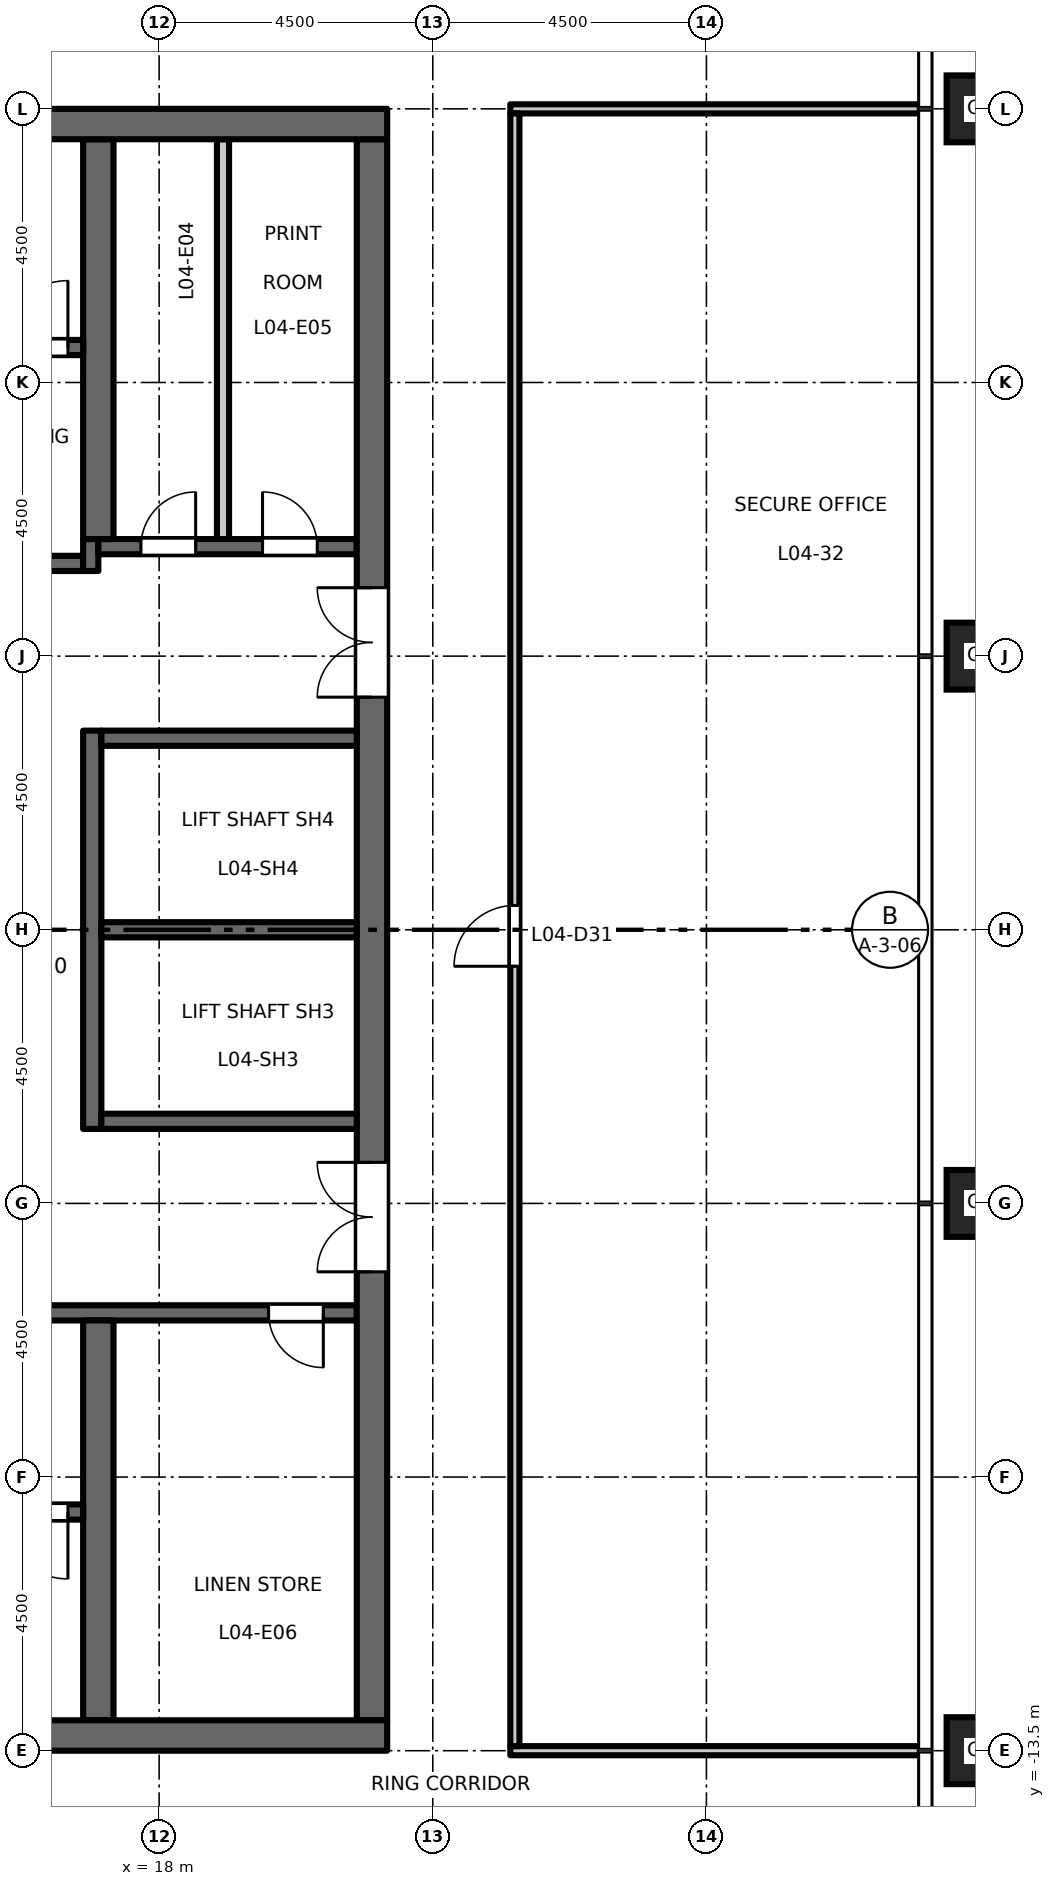
"""IFC4 building model, lengths in metres.
Left out: names, types, materials, properties, quantities, classifications, styles, units other than length and angle.
Written with IfcOpenShell. Run it as: python <this file> out.ifc"""

import sys

from ifc_helpers import new_model, si_unit, direction, frame, frame_2d, origin, origin_2d, place, context, subcontext, project, spatial, rectangle, hollow_rectangle, extrude, element, fill, save


model = new_model("IFC4")
c1 = context("Model", 3, precision=1e-05, world=origin(), true_north=direction((0.0, 1.0)))
c2 = subcontext(c1, "Body", "Model", "MODEL_VIEW")
j1 = project(units=[si_unit("LENGTHUNIT", "METRE"), si_unit("PLANEANGLEUNIT", "RADIAN")], contexts=[c1])
p1 = place(None, origin())
s1 = spatial("IfcSite", under=j1, at=p1, CompositionType="ELEMENT")
p2 = place(p1, origin())
s2 = spatial("IfcBuilding", under=s1, at=p2, CompositionType="ELEMENT")
p3 = place(p2, frame((0.0, 0.0, 22.2)))
s3 = spatial("IfcBuildingStorey", under=s2, at=p3, CompositionType="ELEMENT", Elevation=22.2)
for number, where, z_axis, x_axis in (
    (1, (31.5, -13.5, 0.0), (0.0, 0.0, 1.0), (1.0, 0.0, 0.0)),
    (2, (31.5, -4.5, 0.0), (0.0, 0.0, 1.0), (1.0, 0.0, 0.0)),
    (3, (31.5, 4.5, 0.0), (0.0, 0.0, 1.0), (1.0, 0.0, 0.0)),
    (4, (31.5, 13.5, 0.0), (0.0, 0.0, 1.0), (1.0, 0.0, 0.0)),
):
    element("IfcColumn", number, at=place(p3, frame(where, z_axis=z_axis, x_axis=x_axis)), inside=s3, PredefinedType="COLUMN", context=c2, shape_type="SweptSolid", body=[
        extrude(hollow_rectangle(XDim=1.1, YDim=1.1, WallThickness=0.07, at=origin_2d()), origin(), (0.0, 0.0, 1.0), 4.5),
    ])
p4 = place(p3, frame((12.15, 6.025, 0.0), z_axis=(0.0, 0.0, 1.0), x_axis=(1.0, 0.0, 0.0)))
e5 = element("IfcWall", 5, at=p4, inside=s3, PredefinedType="SHEAR", context=c2, shape_type="SweptSolid", body=[
    extrude(rectangle(XDim=4.6, YDim=0.25, at=frame_2d((2.3, 0.0))), origin(), (0.0, 0.0, 1.0), 4.35),
])
p5 = place(p4, frame((1.8, 0.0, 0.0)))
e6 = element("IfcOpeningElement", 6, at=p5, cuts=e5, PredefinedType="OPENING", context=c2, shape_type="SweptSolid", body=[
    extrude(rectangle(XDim=1.0, YDim=2.1, at=frame_2d((0.5, 1.05))), frame((0.0, 0.135, 0.0), z_axis=(0.0, -1.0, 0.0), x_axis=(1.0, 0.0, 0.0)), (0.0, 0.0, 1.0), 0.27),
])
p6 = place(p3, frame((16.875, 5.9, 0.0), z_axis=(0.0, 0.0, 1.0), x_axis=(0.0, 1.0, 0.0)))
e7 = element("IfcWall", 7, at=p6, inside=s3, PredefinedType="SHEAR", context=c2, shape_type="SweptSolid", body=[
    extrude(rectangle(XDim=0.525, YDim=0.25, at=frame_2d((0.263, 0.0))), origin(), (0.0, 0.0, 1.0), 4.35),
])
p7 = place(p3, frame((17.0, 6.3, 0.0), z_axis=(0.0, 0.0, 1.0), x_axis=(1.0, 0.0, 0.0)))
e8 = element("IfcWall", 8, at=p7, inside=s3, PredefinedType="SHEAR", context=c2, shape_type="SweptSolid", body=[
    extrude(rectangle(XDim=4.25, YDim=0.25, at=frame_2d((2.125, 0.0))), origin(), (0.0, 0.0, 1.0), 4.35),
])
p8 = place(p7, frame((0.7, 0.0, 0.0)))
e9 = element("IfcOpeningElement", 9, at=p8, cuts=e8, PredefinedType="OPENING", context=c2, shape_type="SweptSolid", body=[
    extrude(rectangle(XDim=0.9, YDim=2.1, at=frame_2d((0.45, 1.05))), frame((0.0, 0.135, 0.0), z_axis=(0.0, -1.0, 0.0), x_axis=(1.0, 0.0, 0.0)), (0.0, 0.0, 1.0), 0.27),
])
p9 = place(p7, frame((2.7, 0.0, 0.0)))
e10 = element("IfcOpeningElement", 10, at=p9, cuts=e8, PredefinedType="OPENING", context=c2, shape_type="SweptSolid", body=[
    extrude(rectangle(XDim=0.9, YDim=2.1, at=frame_2d((0.45, 1.05))), frame((0.0, 0.135, 0.0), z_axis=(0.0, -1.0, 0.0), x_axis=(1.0, 0.0, 0.0)), (0.0, 0.0, 1.0), 0.27),
])
p10 = place(p3, frame((12.15, -6.3, 0.0), z_axis=(0.0, 0.0, 1.0), x_axis=(1.0, 0.0, 0.0)))
e11 = element("IfcWall", 11, at=p10, inside=s3, PredefinedType="SHEAR", context=c2, shape_type="SweptSolid", body=[
    extrude(rectangle(XDim=9.1, YDim=0.25, at=frame_2d((4.55, 0.0))), origin(), (0.0, 0.0, 1.0), 4.35),
])
p11 = place(p10, frame((1.8, 0.0, 0.0)))
e12 = element("IfcOpeningElement", 12, at=p11, cuts=e11, PredefinedType="OPENING", context=c2, shape_type="SweptSolid", body=[
    extrude(rectangle(XDim=1.0, YDim=2.1, at=frame_2d((0.5, 1.05))), frame((0.0, 0.135, 0.0), z_axis=(0.0, -1.0, 0.0), x_axis=(1.0, 0.0, 0.0)), (0.0, 0.0, 1.0), 0.27),
])
p12 = place(p10, frame((7.65, 0.0, 0.0)))
e13 = element("IfcOpeningElement", 13, at=p12, cuts=e11, PredefinedType="OPENING", context=c2, shape_type="SweptSolid", body=[
    extrude(rectangle(XDim=0.9, YDim=2.1, at=frame_2d((0.45, 1.05))), frame((0.0, 0.135, 0.0), z_axis=(0.0, -1.0, 0.0), x_axis=(1.0, 0.0, 0.0)), (0.0, 0.0, 1.0), 0.27),
])
p13 = place(p3, frame((21.5, -13.0, 0.0), z_axis=(0.0, 0.0, 1.0), x_axis=(0.0, 1.0, 0.0)))
e14 = element("IfcWall", 14, at=p13, inside=s3, PredefinedType="SHEAR", context=c2, shape_type="SweptSolid", body=[
    extrude(rectangle(XDim=26.0, YDim=0.5, at=frame_2d((13.0, 0.0))), origin(), (0.0, 0.0, 1.0), 4.35),
])
p14 = place(p13, frame((16.825, 0.0, 0.0)))
e15 = element("IfcOpeningElement", 15, at=p14, cuts=e14, PredefinedType="OPENING", context=c2, shape_type="SweptSolid", body=[
    extrude(rectangle(XDim=1.8, YDim=2.1, at=frame_2d((0.9, 1.05))), frame((0.0, 0.26, 0.0), z_axis=(0.0, -1.0, 0.0), x_axis=(1.0, 0.0, 0.0)), (0.0, 0.0, 1.0), 0.52),
])
p15 = place(p13, frame((7.375, 0.0, 0.0)))
e16 = element("IfcOpeningElement", 16, at=p15, cuts=e14, PredefinedType="OPENING", context=c2, shape_type="SweptSolid", body=[
    extrude(rectangle(XDim=1.8, YDim=2.1, at=frame_2d((0.9, 1.05))), frame((0.0, 0.26, 0.0), z_axis=(0.0, -1.0, 0.0), x_axis=(1.0, 0.0, 0.0)), (0.0, 0.0, 1.0), 0.52),
])
p16 = place(p3, frame((19.05, 6.425, 0.0), z_axis=(0.0, 0.0, 1.0), x_axis=(0.0, 1.0, 0.0)))
e17 = element("IfcWall", 17, at=p16, inside=s3, PredefinedType="PARTITIONING", context=c2, shape_type="SweptSolid", body=[
    extrude(rectangle(XDim=6.575, YDim=0.2, at=frame_2d((3.288, 0.0))), origin(), (0.0, 0.0, 1.0), 4.35),
])
p17 = place(p3, frame((16.9, -3.275, 0.0), z_axis=(0.0, 0.0, 1.0), x_axis=(0.0, 1.0, 0.0)))
e18 = element("IfcWall", 18, at=p17, inside=s3, PredefinedType="SHEAR", context=c2, shape_type="SweptSolid", body=[
    extrude(rectangle(XDim=6.55, YDim=0.3, at=frame_2d((3.275, 0.0))), origin(), (0.0, 0.0, 1.0), 4.35),
])
for number, where, z_axis, x_axis in (
    (19, (17.05, 0.0, 0.0), (0.0, 0.0, 1.0), (1.0, 0.0, 0.0)),
    (20, (17.05, 3.15, 0.0), (0.0, 0.0, 1.0), (1.0, 0.0, 0.0)),
    (21, (17.05, -3.15, 0.0), (0.0, 0.0, 1.0), (1.0, 0.0, 0.0)),
):
    element("IfcWall", number, at=place(p3, frame(where, z_axis=z_axis, x_axis=x_axis)), inside=s3, PredefinedType="SHEAR", context=c2, shape_type="SweptSolid", body=[
        extrude(rectangle(XDim=4.2, YDim=0.25, at=frame_2d((2.1, 0.0))), origin(), (0.0, 0.0, 1.0), 4.35),
    ])
for number, where, z_axis, x_axis in (
    (22, (17.0, 6.425, 0.0), (0.0, 0.0, 1.0), (0.0, 1.0, 0.0)),
    (23, (17.0, -13.0, 0.0), (0.0, 0.0, 1.0), (0.0, 1.0, 0.0)),
):
    element("IfcWall", number, at=place(p3, frame(where, z_axis=z_axis, x_axis=x_axis)), inside=s3, PredefinedType="SHEAR", context=c2, shape_type="SweptSolid", body=[
        extrude(rectangle(XDim=6.575, YDim=0.5, at=frame_2d((3.288, 0.0))), origin(), (0.0, 0.0, 1.0), 4.35),
    ])
p18 = place(p3, frame((8.75, 9.575, 0.0), z_axis=(0.0, 0.0, 1.0), x_axis=(1.0, 0.0, 0.0)))
e24 = element("IfcWall", 24, at=p18, inside=s3, PredefinedType="SHEAR", context=c2, shape_type="SweptSolid", body=[
    extrude(rectangle(XDim=8.0, YDim=0.25, at=frame_2d((4.0, 0.0))), origin(), (0.0, 0.0, 1.0), 4.35),
])
p19 = place(p18, frame((6.65, 0.0, 0.0)))
e25 = element("IfcOpeningElement", 25, at=p19, cuts=e24, PredefinedType="OPENING", context=c2, shape_type="SweptSolid", body=[
    extrude(rectangle(XDim=1.1, YDim=2.1, at=frame_2d((0.55, 1.05))), frame((0.0, 0.135, 0.0), z_axis=(0.0, -1.0, 0.0), x_axis=(1.0, 0.0, 0.0)), (0.0, 0.0, 1.0), 0.27),
])
p20 = place(p3, frame((8.75, -9.575, 0.0), z_axis=(0.0, 0.0, 1.0), x_axis=(1.0, 0.0, 0.0)))
e26 = element("IfcWall", 26, at=p20, inside=s3, PredefinedType="SHEAR", context=c2, shape_type="SweptSolid", body=[
    extrude(rectangle(XDim=8.0, YDim=0.25, at=frame_2d((4.0, 0.0))), origin(), (0.0, 0.0, 1.0), 4.35),
])
p21 = place(p20, frame((6.65, 0.0, 0.0)))
e27 = element("IfcOpeningElement", 27, at=p21, cuts=e26, PredefinedType="OPENING", context=c2, shape_type="SweptSolid", body=[
    extrude(rectangle(XDim=1.1, YDim=2.1, at=frame_2d((0.55, 1.05))), frame((0.0, 0.135, 0.0), z_axis=(0.0, -1.0, 0.0), x_axis=(1.0, 0.0, 0.0)), (0.0, 0.0, 1.0), 0.27),
])
for number, where, z_axis, x_axis in (
    (28, (8.25, 13.25, 0.0), (0.0, 0.0, 1.0), (1.0, 0.0, 0.0)),
    (29, (8.25, -13.25, 0.0), (0.0, 0.0, 1.0), (1.0, 0.0, 0.0)),
):
    element("IfcWall", number, at=place(p3, frame(where, z_axis=z_axis, x_axis=x_axis)), inside=s3, PredefinedType="SHEAR", context=c2, shape_type="SweptSolid", body=[
        extrude(rectangle(XDim=13.5, YDim=0.5, at=frame_2d((6.75, 0.0))), origin(), (0.0, 0.0, 1.0), 4.35),
    ])
for number, where, z_axis, x_axis in (
    (30, (23.775, -13.5, 0.0), (0.0, 0.0, 1.0), (1.0, 0.0, 0.0)),
    (31, (23.775, 13.5, 0.0), (0.0, 0.0, 1.0), (1.0, 0.0, 0.0)),
):
    element("IfcWall", number, at=place(p3, frame(where, z_axis=z_axis, x_axis=x_axis)), inside=s3, PredefinedType="PARTITIONING", context=c2, shape_type="SweptSolid", body=[
        extrude(rectangle(XDim=6.735, YDim=0.15, at=frame_2d((3.368, 0.0))), origin(), (0.0, 0.0, 1.0), 3.35),
    ])
p22 = place(p3, frame((23.85, -13.425, 0.0), z_axis=(0.0, 0.0, 1.0), x_axis=(0.0, 1.0, 0.0)))
e32 = element("IfcWall", 32, at=p22, inside=s3, PredefinedType="PARTITIONING", context=c2, shape_type="SweptSolid", body=[
    extrude(rectangle(XDim=26.85, YDim=0.15, at=frame_2d((13.425, 0.0))), origin(), (0.0, 0.0, 1.0), 4.35),
])
p23 = place(p22, frame((12.825, 0.0, 0.0)))
e33 = element("IfcOpeningElement", 33, at=p23, cuts=e32, PredefinedType="OPENING", context=c2, shape_type="SweptSolid", body=[
    extrude(rectangle(XDim=1.0, YDim=2.1, at=frame_2d((0.5, 1.05))), frame((0.0, 0.085, 0.0), z_axis=(0.0, -1.0, 0.0), x_axis=(1.0, 0.0, 0.0)), (0.0, 0.0, 1.0), 0.17),
])
p24 = place(p19, origin())
e34 = element("IfcDoor", 34, at=p24, inside=s3, OperationType="SINGLE_SWING_LEFT", PredefinedType="DOOR", context=c2, shape_type="SweptSolid", body=[
    extrude(rectangle(XDim=1.1, YDim=2.1, at=frame_2d((0.55, 1.05))), frame((0.0, 0.025, 0.0), z_axis=(0.0, -1.0, 0.0), x_axis=(1.0, 0.0, 0.0)), (0.0, 0.0, 1.0), 0.05),
])
fill(e25, e34)
p25 = place(p21, origin())
e35 = element("IfcDoor", 35, at=p25, inside=s3, OperationType="SINGLE_SWING_RIGHT", PredefinedType="DOOR", context=c2, shape_type="SweptSolid", body=[
    extrude(rectangle(XDim=1.1, YDim=2.1, at=frame_2d((0.55, 1.05))), frame((0.0, 0.025, 0.0), z_axis=(0.0, -1.0, 0.0), x_axis=(1.0, 0.0, 0.0)), (0.0, 0.0, 1.0), 0.05),
])
fill(e27, e35)
p26 = place(p14, origin())
e36 = element("IfcDoor", 36, at=p26, inside=s3, OperationType="DOUBLE_DOOR_DOUBLE_SWING", PredefinedType="DOOR", context=c2, shape_type="SweptSolid", body=[
    extrude(rectangle(XDim=1.8, YDim=2.1, at=frame_2d((0.9, 1.05))), frame((0.0, 0.025, 0.0), z_axis=(0.0, -1.0, 0.0), x_axis=(1.0, 0.0, 0.0)), (0.0, 0.0, 1.0), 0.05),
])
fill(e15, e36)
p27 = place(p15, origin())
e37 = element("IfcDoor", 37, at=p27, inside=s3, OperationType="DOUBLE_DOOR_DOUBLE_SWING", PredefinedType="DOOR", context=c2, shape_type="SweptSolid", body=[
    extrude(rectangle(XDim=1.8, YDim=2.1, at=frame_2d((0.9, 1.05))), frame((0.0, 0.025, 0.0), z_axis=(0.0, -1.0, 0.0), x_axis=(1.0, 0.0, 0.0)), (0.0, 0.0, 1.0), 0.05),
])
fill(e16, e37)
p28 = place(p8, origin())
e38 = element("IfcDoor", 38, at=p28, inside=s3, OperationType="SINGLE_SWING_LEFT", PredefinedType="DOOR", context=c2, shape_type="SweptSolid", body=[
    extrude(rectangle(XDim=0.9, YDim=2.1, at=frame_2d((0.45, 1.05))), frame((0.0, 0.025, 0.0), z_axis=(0.0, -1.0, 0.0), x_axis=(1.0, 0.0, 0.0)), (0.0, 0.0, 1.0), 0.05),
])
fill(e9, e38)
p29 = place(p9, origin())
e39 = element("IfcDoor", 39, at=p29, inside=s3, OperationType="SINGLE_SWING_RIGHT", PredefinedType="DOOR", context=c2, shape_type="SweptSolid", body=[
    extrude(rectangle(XDim=0.9, YDim=2.1, at=frame_2d((0.45, 1.05))), frame((0.0, 0.025, 0.0), z_axis=(0.0, -1.0, 0.0), x_axis=(1.0, 0.0, 0.0)), (0.0, 0.0, 1.0), 0.05),
])
fill(e10, e39)
p30 = place(p12, origin())
e40 = element("IfcDoor", 40, at=p30, inside=s3, OperationType="SINGLE_SWING_RIGHT", PredefinedType="DOOR", context=c2, shape_type="SweptSolid", body=[
    extrude(rectangle(XDim=0.9, YDim=2.1, at=frame_2d((0.45, 1.05))), frame((0.0, 0.025, 0.0), z_axis=(0.0, -1.0, 0.0), x_axis=(1.0, 0.0, 0.0)), (0.0, 0.0, 1.0), 0.05),
])
fill(e13, e40)
p31 = place(p23, origin())
e41 = element("IfcDoor", 41, at=p31, inside=s3, OperationType="SINGLE_SWING_LEFT", PredefinedType="DOOR", context=c2, shape_type="SweptSolid", body=[
    extrude(rectangle(XDim=1.0, YDim=2.1, at=frame_2d((0.5, 1.05))), frame((0.0, 0.025, 0.0), z_axis=(0.0, -1.0, 0.0), x_axis=(1.0, 0.0, 0.0)), (0.0, 0.0, 1.0), 0.05),
])
fill(e33, e41)
save(model, sys.argv[1])
